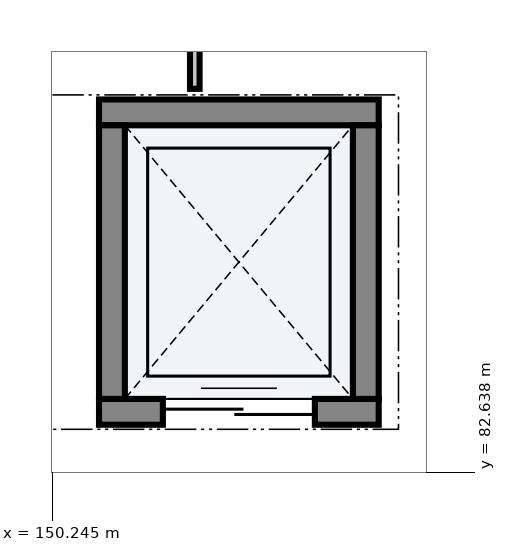
"""IFC4 building model, lengths in metres.
Left out: names, types, materials, properties, quantities, classifications, styles, units other than length and angle.
Written with IfcOpenShell. Run it as: python <this file> out.ifc"""

import sys

from ifc_helpers import new_model, si_unit, direction, frame, frame_2d, origin, place, context, subcontext, project, spatial, rectangle, extrude, element, fill, save


model = new_model("IFC4")
c1 = context("Model", 3, precision=1e-05, world=origin(), true_north=direction((0.0, 1.0)))
c2 = subcontext(c1, "Body", "Model", "MODEL_VIEW")
j1 = project(units=[si_unit("LENGTHUNIT", "METRE"), si_unit("PLANEANGLEUNIT", "RADIAN")], contexts=[c1])
p1 = place(None, origin())
s1 = spatial("IfcSite", under=j1, at=p1, CompositionType="ELEMENT")
p2 = place(p1, origin())
s2 = spatial("IfcBuilding", under=s1, at=p2, CompositionType="ELEMENT")
p3 = place(p2, frame((0.0, 0.0, 10.2)))
s3 = spatial("IfcBuildingStorey", under=s2, at=p3, CompositionType="ELEMENT", Elevation=10.2)
p4 = place(p3, frame((150.86, 83.43, 0.0), z_axis=(0.0, 0.0, 1.0), x_axis=(1.0, 0.0, 0.0)))
e1 = element("IfcWall", 1, at=p4, inside=s3, PredefinedType="SHEAR", context=c2, shape_type="SweptSolid", body=[
    extrude(rectangle(XDim=3.68, YDim=0.34, at=frame_2d((1.84, 0.0))), origin(), (0.0, 0.0, 1.0), 4.515),
])
p5 = place(p4, frame((0.84, 0.0, 0.0)))
e2 = element("IfcOpeningElement", 2, at=p5, cuts=e1, PredefinedType="OPENING", context=c2, shape_type="SweptSolid", body=[
    extrude(rectangle(XDim=2.0, YDim=2.4, at=frame_2d((1.0, 1.2))), frame((0.0, 0.182, 0.0), z_axis=(0.0, -1.0, 0.0), x_axis=(1.0, 0.0, 0.0)), (0.0, 0.0, 1.0), 0.364),
])
p6 = place(p3, frame((150.86, 87.37, 0.0), z_axis=(0.0, 0.0, 1.0), x_axis=(1.0, 0.0, 0.0)))
e3 = element("IfcWall", 3, at=p6, inside=s3, PredefinedType="SHEAR", context=c2, shape_type="SweptSolid", body=[
    extrude(rectangle(XDim=3.68, YDim=0.34, at=frame_2d((1.84, 0.0))), origin(), (0.0, 0.0, 1.0), 4.515),
])
for number, where, z_axis, x_axis in (
    (4, (151.03, 83.6, 0.0), (0.0, 0.0, 1.0), (0.0, 1.0, 0.0)),
    (5, (154.37, 83.6, 0.0), (0.0, 0.0, 1.0), (0.0, 1.0, 0.0)),
):
    element("IfcWall", number, at=place(p3, frame(where, z_axis=z_axis, x_axis=x_axis)), inside=s3, PredefinedType="SHEAR", context=c2, shape_type="SweptSolid", body=[
        extrude(rectangle(XDim=3.6, YDim=0.34, at=frame_2d((1.8, 0.0))), origin(), (0.0, 0.0, 1.0), 4.515),
    ])
p7 = place(p3, frame((152.12, 87.68, 0.0), z_axis=(0.0, 0.0, 1.0), x_axis=(0.0, 1.0, 0.0)))
e6 = element("IfcWall", 6, at=p7, inside=s3, PredefinedType="PARTITIONING", context=c2, shape_type="SweptSolid", body=[
    extrude(rectangle(XDim=4.2, YDim=0.126, at=frame_2d((2.1, 0.0))), origin(), (0.0, 0.0, 1.0), 3.455),
])
p8 = place(p5, origin())
e7 = element("IfcDoor", 7, at=p8, inside=s3, OperationType="DOUBLE_DOOR_SLIDING", PredefinedType="DOOR", context=c2, shape_type="SweptSolid", body=[
    extrude(rectangle(XDim=2.0, YDim=2.4, at=frame_2d((1.0, 1.2))), frame((0.0, 0.025, 0.0), z_axis=(0.0, -1.0, 0.0), x_axis=(1.0, 0.0, 0.0)), (0.0, 0.0, 1.0), 0.05),
])
fill(e2, e7)
save(model, sys.argv[1])
